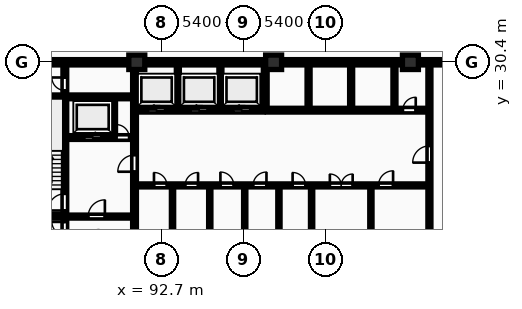
"""IFC4 building model, lengths in metres.
Left out: names, types, materials, properties, quantities, classifications, styles, units other than length and angle.
Written with IfcOpenShell. Run it as: python <this file> out.ifc"""

import sys

from ifc_helpers import new_model, si_unit, direction, frame, frame_2d, origin, origin_2d, place, context, subcontext, project, spatial, rectangle, extrude, element, fill, save


model = new_model("IFC4")
c1 = context("Model", 3, precision=1e-05, world=origin(), true_north=direction((0.0, 1.0)))
c2 = subcontext(c1, "Body", "Model", "MODEL_VIEW")
j1 = project(units=[si_unit("LENGTHUNIT", "METRE"), si_unit("PLANEANGLEUNIT", "RADIAN")], contexts=[c1])
p1 = place(None, origin())
s1 = spatial("IfcSite", under=j1, at=p1, CompositionType="ELEMENT")
p2 = place(p1, origin())
s2 = spatial("IfcBuilding", under=s1, at=p2, CompositionType="ELEMENT")
p3 = place(p2, frame((0.0, 0.0, -10.8)))
s3 = spatial("IfcBuildingStorey", under=s2, at=p3, CompositionType="ELEMENT", Elevation=-10.8)
for number, where, z_axis, x_axis in (
    (1, (91.1, 30.4, -0.45), (0.0, 0.0, 1.0), (1.0, 0.0, 0.0)),
    (2, (100.1, 30.4, -0.45), (0.0, 0.0, 1.0), (1.0, 0.0, 0.0)),
    (3, (109.1, 30.4, -0.45), (0.0, 0.0, 1.0), (1.0, 0.0, 0.0)),
):
    element("IfcColumn", number, at=place(p3, frame(where, z_axis=z_axis, x_axis=x_axis)), inside=s3, PredefinedType="COLUMN", context=c2, shape_type="SweptSolid", body=[
        extrude(rectangle(XDim=1.05, YDim=0.95, at=origin_2d()), origin(), (0.0, 0.0, 1.0), 4.05),
    ])
p4 = place(p3, frame((81.925, 30.4, 0.0), z_axis=(0.0, 0.0, 1.0), x_axis=(1.0, 0.0, 0.0)))
e4 = element("IfcWall", 4, at=p4, inside=s3, PredefinedType="SHEAR", context=c2, shape_type="SweptSolid", body=[
    extrude(rectangle(XDim=36.265, YDim=0.35, at=frame_2d((18.132, 0.0))), origin(), (0.0, 0.0, 1.0), 3.6),
])
p5 = place(p3, frame((86.365, 18.6, 0.0), z_axis=(0.0, 0.0, 1.0), x_axis=(0.0, 1.0, 0.0)))
e5 = element("IfcWall", 5, at=p5, inside=s3, PredefinedType="SHEAR", context=c2, shape_type="SweptSolid", body=[
    extrude(rectangle(XDim=11.6, YDim=0.25, at=frame_2d((5.8, 0.0))), origin(), (0.0, 0.0, 1.0), 3.6),
])
p6 = place(p5, frame((0.45, 0.0, 0.0)))
e6 = element("IfcOpeningElement", 6, at=p6, cuts=e5, PredefinedType="OPENING", context=c2, shape_type="SweptSolid", body=[
    extrude(rectangle(XDim=0.85, YDim=2.05, at=frame_2d((0.425, 1.025))), frame((0.0, 0.135, 0.0), z_axis=(0.0, -1.0, 0.0), x_axis=(1.0, 0.0, 0.0)), (0.0, 0.0, 1.0), 0.27),
])
p7 = place(p5, frame((2.05, 0.0, 0.0)))
e7 = element("IfcOpeningElement", 7, at=p7, cuts=e5, PredefinedType="OPENING", context=c2, shape_type="SweptSolid", body=[
    extrude(rectangle(XDim=1.1, YDim=2.1, at=frame_2d((0.55, 1.05))), frame((0.0, 0.135, 0.0), z_axis=(0.0, -1.0, 0.0), x_axis=(1.0, 0.0, 0.0)), (0.0, 0.0, 1.0), 0.27),
])
p8 = place(p5, frame((9.95, 0.0, 0.0)))
e8 = element("IfcOpeningElement", 8, at=p8, cuts=e5, PredefinedType="OPENING", context=c2, shape_type="SweptSolid", body=[
    extrude(rectangle(XDim=0.85, YDim=2.05, at=frame_2d((0.425, 1.025))), frame((0.0, 0.135, 0.0), z_axis=(0.0, -1.0, 0.0), x_axis=(1.0, 0.0, 0.0)), (0.0, 0.0, 1.0), 0.27),
])
p9 = place(p3, frame((83.0, 20.275, 0.0), z_axis=(0.0, 0.0, 1.0), x_axis=(1.0, 0.0, 0.0)))
e9 = element("IfcWall", 9, at=p9, inside=s3, PredefinedType="SHEAR", context=c2, shape_type="SweptSolid", body=[
    extrude(rectangle(XDim=3.24, YDim=0.25, at=frame_2d((1.62, 0.0))), origin(), (0.0, 0.0, 1.0), 3.6),
])
p10 = place(p3, frame((83.0, 28.125, 0.0), z_axis=(0.0, 0.0, 1.0), x_axis=(1.0, 0.0, 0.0)))
e10 = element("IfcWall", 10, at=p10, inside=s3, PredefinedType="SHEAR", context=c2, shape_type="SweptSolid", body=[
    extrude(rectangle(XDim=7.82, YDim=0.25, at=frame_2d((3.91, 0.0))), origin(), (0.0, 0.0, 1.0), 3.6),
])
p11 = place(p3, frame((86.5, 25.45, 0.0), z_axis=(0.0, 0.0, 1.0), x_axis=(1.0, 0.0, 0.0)))
e11 = element("IfcWall", 11, at=p11, inside=s3, PredefinedType="SHEAR", context=c2, shape_type="SweptSolid", body=[
    extrude(rectangle(XDim=4.32, YDim=0.25, at=frame_2d((2.16, 0.0))), origin(), (0.0, 0.0, 1.0), 3.6),
])
p12 = place(p11, frame((1.14, 0.0, 0.0)))
e12 = element("IfcOpeningElement", 12, at=p12, cuts=e11, PredefinedType="OPENING", context=c2, shape_type="SweptSolid", body=[
    extrude(rectangle(XDim=1.12, YDim=2.12, at=frame_2d((0.56, 1.06))), frame((0.0, 0.135, 0.0), z_axis=(0.0, -1.0, 0.0), x_axis=(1.0, 0.0, 0.0)), (0.0, 0.0, 1.0), 0.27),
])
p13 = place(p11, frame((3.25, 0.0, 0.0)))
e13 = element("IfcOpeningElement", 13, at=p13, cuts=e11, PredefinedType="OPENING", context=c2, shape_type="SweptSolid", body=[
    extrude(rectangle(XDim=0.85, YDim=2.05, at=frame_2d((0.425, 1.025))), frame((0.0, 0.135, 0.0), z_axis=(0.0, -1.0, 0.0), x_axis=(1.0, 0.0, 0.0)), (0.0, 0.0, 1.0), 0.27),
])
p14 = place(p3, frame((89.6, 25.58, 0.0), z_axis=(0.0, 0.0, 1.0), x_axis=(0.0, 1.0, 0.0)))
e14 = element("IfcWall", 14, at=p14, inside=s3, PredefinedType="PARTITIONING", context=c2, shape_type="SweptSolid", body=[
    extrude(rectangle(XDim=2.42, YDim=0.2, at=frame_2d((1.21, 0.0))), origin(), (0.0, 0.0, 1.0), 3.3),
])
p15 = place(p3, frame((86.5, 20.25, 0.0), z_axis=(0.0, 0.0, 1.0), x_axis=(1.0, 0.0, 0.0)))
e15 = element("IfcWall", 15, at=p15, inside=s3, PredefinedType="PARTITIONING", context=c2, shape_type="SweptSolid", body=[
    extrude(rectangle(XDim=4.32, YDim=0.2, at=frame_2d((2.16, 0.0))), origin(), (0.0, 0.0, 1.0), 3.3),
])
p16 = place(p15, frame((1.4, 0.0, 0.0)))
e16 = element("IfcOpeningElement", 16, at=p16, cuts=e15, PredefinedType="OPENING", context=c2, shape_type="SweptSolid", body=[
    extrude(rectangle(XDim=1.1, YDim=2.1, at=frame_2d((0.55, 1.05))), frame((0.0, 0.11, 0.0), z_axis=(0.0, -1.0, 0.0), x_axis=(1.0, 0.0, 0.0)), (0.0, 0.0, 1.0), 0.22),
])
p17 = place(p3, frame((90.95, 18.6, 0.0), z_axis=(0.0, 0.0, 1.0), x_axis=(0.0, 1.0, 0.0)))
e17 = element("IfcWall", 17, at=p17, inside=s3, PredefinedType="SHEAR", context=c2, shape_type="SweptSolid", body=[
    extrude(rectangle(XDim=11.6, YDim=0.25, at=frame_2d((5.8, 0.0))), origin(), (0.0, 0.0, 1.0), 3.6),
])
p18 = place(p17, frame((4.6, 0.0, 0.0)))
e18 = element("IfcOpeningElement", 18, at=p18, cuts=e17, PredefinedType="OPENING", context=c2, shape_type="SweptSolid", body=[
    extrude(rectangle(XDim=1.1, YDim=2.1, at=frame_2d((0.55, 1.05))), frame((0.0, 0.135, 0.0), z_axis=(0.0, -1.0, 0.0), x_axis=(1.0, 0.0, 0.0)), (0.0, 0.0, 1.0), 0.27),
])
for number, where, z_axis, x_axis in (
    (19, (93.8, 27.38, 0.0), (0.0, 0.0, 1.0), (0.0, 1.0, 0.0)),
    (20, (96.6, 27.38, 0.0), (0.0, 0.0, 1.0), (0.0, 1.0, 0.0)),
):
    element("IfcWall", number, at=place(p3, frame(where, z_axis=z_axis, x_axis=x_axis)), inside=s3, PredefinedType="PARTITIONING", context=c2, shape_type="SweptSolid", body=[
        extrude(rectangle(XDim=2.82, YDim=0.2, at=frame_2d((1.41, 0.0))), origin(), (0.0, 0.0, 1.0), 3.3),
    ])
p19 = place(p3, frame((91.08, 27.25, 0.0), z_axis=(0.0, 0.0, 1.0), x_axis=(1.0, 0.0, 0.0)))
e21 = element("IfcWall", 21, at=p19, inside=s3, PredefinedType="SHEAR", context=c2, shape_type="SweptSolid", body=[
    extrude(rectangle(XDim=8.34, YDim=0.25, at=frame_2d((4.17, 0.0))), origin(), (0.0, 0.0, 1.0), 3.6),
])
p20 = place(p19, frame((0.76, 0.0, 0.0)))
e22 = element("IfcOpeningElement", 22, at=p20, cuts=e21, PredefinedType="OPENING", context=c2, shape_type="SweptSolid", body=[
    extrude(rectangle(XDim=1.12, YDim=2.12, at=frame_2d((0.56, 1.06))), frame((0.0, 0.135, 0.0), z_axis=(0.0, -1.0, 0.0), x_axis=(1.0, 0.0, 0.0)), (0.0, 0.0, 1.0), 0.27),
])
p21 = place(p19, frame((3.56, 0.0, 0.0)))
e23 = element("IfcOpeningElement", 23, at=p21, cuts=e21, PredefinedType="OPENING", context=c2, shape_type="SweptSolid", body=[
    extrude(rectangle(XDim=1.12, YDim=2.12, at=frame_2d((0.56, 1.06))), frame((0.0, 0.135, 0.0), z_axis=(0.0, -1.0, 0.0), x_axis=(1.0, 0.0, 0.0)), (0.0, 0.0, 1.0), 0.27),
])
p22 = place(p19, frame((6.36, 0.0, 0.0)))
e24 = element("IfcOpeningElement", 24, at=p22, cuts=e21, PredefinedType="OPENING", context=c2, shape_type="SweptSolid", body=[
    extrude(rectangle(XDim=1.12, YDim=2.12, at=frame_2d((0.56, 1.06))), frame((0.0, 0.135, 0.0), z_axis=(0.0, -1.0, 0.0), x_axis=(1.0, 0.0, 0.0)), (0.0, 0.0, 1.0), 0.27),
])
p23 = place(p3, frame((99.55, 27.25, 0.0), z_axis=(0.0, 0.0, 1.0), x_axis=(0.0, 1.0, 0.0)))
e25 = element("IfcWall", 25, at=p23, inside=s3, PredefinedType="SHEAR", context=c2, shape_type="SweptSolid", body=[
    extrude(rectangle(XDim=2.95, YDim=0.25, at=frame_2d((1.475, 0.0))), origin(), (0.0, 0.0, 1.0), 3.6),
])
for number, where, z_axis, x_axis in (
    (26, (102.4, 27.38, 0.0), (0.0, 0.0, 1.0), (0.0, 1.0, 0.0)),
    (27, (105.2, 27.38, 0.0), (0.0, 0.0, 1.0), (0.0, 1.0, 0.0)),
    (28, (108.05, 27.38, 0.0), (0.0, 0.0, 1.0), (0.0, 1.0, 0.0)),
):
    element("IfcWall", number, at=place(p3, frame(where, z_axis=z_axis, x_axis=x_axis)), inside=s3, PredefinedType="PARTITIONING", context=c2, shape_type="SweptSolid", body=[
        extrude(rectangle(XDim=2.82, YDim=0.2, at=frame_2d((1.41, 0.0))), origin(), (0.0, 0.0, 1.0), 3.3),
    ])
p24 = place(p3, frame((99.68, 27.25, 0.0), z_axis=(0.0, 0.0, 1.0), x_axis=(1.0, 0.0, 0.0)))
e29 = element("IfcWall", 29, at=p24, inside=s3, PredefinedType="SHEAR", context=c2, shape_type="SweptSolid", body=[
    extrude(rectangle(XDim=10.54, YDim=0.25, at=frame_2d((5.27, 0.0))), origin(), (0.0, 0.0, 1.0), 3.6),
])
p25 = place(p24, frame((8.92, 0.0, 0.0)))
e30 = element("IfcOpeningElement", 30, at=p25, cuts=e29, PredefinedType="OPENING", context=c2, shape_type="SweptSolid", body=[
    extrude(rectangle(XDim=0.85, YDim=2.05, at=frame_2d((0.425, 1.025))), frame((0.0, 0.135, 0.0), z_axis=(0.0, -1.0, 0.0), x_axis=(1.0, 0.0, 0.0)), (0.0, 0.0, 1.0), 0.27),
])
for number, where, z_axis, x_axis in (
    (31, (93.45, 18.6, 0.0), (0.0, 0.0, 1.0), (0.0, 1.0, 0.0)),
    (32, (95.9, 18.6, 0.0), (0.0, 0.0, 1.0), (0.0, 1.0, 0.0)),
    (33, (98.2, 18.6, 0.0), (0.0, 0.0, 1.0), (0.0, 1.0, 0.0)),
):
    element("IfcWall", number, at=place(p3, frame(where, z_axis=z_axis, x_axis=x_axis)), inside=s3, PredefinedType="PARTITIONING", context=c2, shape_type="SweptSolid", body=[
        extrude(rectangle(XDim=3.6, YDim=0.15, at=frame_2d((1.8, 0.0))), origin(), (0.0, 0.0, 1.0), 3.3),
    ])
p26 = place(p3, frame((100.45, 18.6, 0.0), z_axis=(0.0, 0.0, 1.0), x_axis=(0.0, 1.0, 0.0)))
e34 = element("IfcWall", 34, at=p26, inside=s3, PredefinedType="PARTITIONING", context=c2, shape_type="SweptSolid", body=[
    extrude(rectangle(XDim=3.6, YDim=0.15, at=frame_2d((1.8, 0.0))), origin(), (0.0, 0.0, 1.0), 2.55),
])
for number, where, z_axis, x_axis in (
    (35, (102.6, 18.6, 0.0), (0.0, 0.0, 1.0), (0.0, 1.0, 0.0)),
    (36, (106.5, 18.6, 0.0), (0.0, 0.0, 1.0), (0.0, 1.0, 0.0)),
):
    element("IfcWall", number, at=place(p3, frame(where, z_axis=z_axis, x_axis=x_axis)), inside=s3, PredefinedType="PARTITIONING", context=c2, shape_type="SweptSolid", body=[
        extrude(rectangle(XDim=3.6, YDim=0.15, at=frame_2d((1.8, 0.0))), origin(), (0.0, 0.0, 1.0), 3.3),
    ])
p27 = place(p3, frame((91.08, 22.3, 0.0), z_axis=(0.0, 0.0, 1.0), x_axis=(1.0, 0.0, 0.0)))
e37 = element("IfcWall", 37, at=p27, inside=s3, PredefinedType="PARTITIONING", context=c2, shape_type="SweptSolid", body=[
    extrude(rectangle(XDim=19.14, YDim=0.2, at=frame_2d((9.57, 0.0))), origin(), (0.0, 0.0, 1.0), 3.3),
])
p28 = place(p27, frame((1.15, 0.0, 0.0)))
e38 = element("IfcOpeningElement", 38, at=p28, cuts=e37, PredefinedType="OPENING", context=c2, shape_type="SweptSolid", body=[
    extrude(rectangle(XDim=0.85, YDim=2.05, at=frame_2d((0.425, 1.025))), frame((0.0, 0.11, 0.0), z_axis=(0.0, -1.0, 0.0), x_axis=(1.0, 0.0, 0.0)), (0.0, 0.0, 1.0), 0.22),
])
p29 = place(p27, frame((3.2, 0.0, 0.0)))
e39 = element("IfcOpeningElement", 39, at=p29, cuts=e37, PredefinedType="OPENING", context=c2, shape_type="SweptSolid", body=[
    extrude(rectangle(XDim=0.85, YDim=2.05, at=frame_2d((0.425, 1.025))), frame((0.0, 0.11, 0.0), z_axis=(0.0, -1.0, 0.0), x_axis=(1.0, 0.0, 0.0)), (0.0, 0.0, 1.0), 0.22),
])
p30 = place(p27, frame((12.72, 0.0, 0.0)))
e40 = element("IfcOpeningElement", 40, at=p30, cuts=e37, PredefinedType="OPENING", context=c2, shape_type="SweptSolid", body=[
    extrude(rectangle(XDim=1.5, YDim=2.2, at=frame_2d((0.75, 1.1))), frame((0.0, 0.11, 0.0), z_axis=(0.0, -1.0, 0.0), x_axis=(1.0, 0.0, 0.0)), (0.0, 0.0, 1.0), 0.22),
])
p31 = place(p27, frame((5.52, 0.0, 0.0)))
e41 = element("IfcOpeningElement", 41, at=p31, cuts=e37, PredefinedType="OPENING", context=c2, shape_type="SweptSolid", body=[
    extrude(rectangle(XDim=0.88, YDim=2.06, at=frame_2d((0.44, 1.03))), frame((0.0, 0.11, 0.0), z_axis=(0.0, -1.0, 0.0), x_axis=(1.0, 0.0, 0.0)), (0.0, 0.0, 1.0), 0.22),
])
p32 = place(p27, frame((7.67, 0.0, 0.0)))
e42 = element("IfcOpeningElement", 42, at=p32, cuts=e37, PredefinedType="OPENING", context=c2, shape_type="SweptSolid", body=[
    extrude(rectangle(XDim=0.88, YDim=2.06, at=frame_2d((0.44, 1.03))), frame((0.0, 0.11, 0.0), z_axis=(0.0, -1.0, 0.0), x_axis=(1.0, 0.0, 0.0)), (0.0, 0.0, 1.0), 0.22),
])
p33 = place(p27, frame((10.27, 0.0, 0.0)))
e43 = element("IfcOpeningElement", 43, at=p33, cuts=e37, PredefinedType="OPENING", context=c2, shape_type="SweptSolid", body=[
    extrude(rectangle(XDim=0.85, YDim=2.05, at=frame_2d((0.425, 1.025))), frame((0.0, 0.11, 0.0), z_axis=(0.0, -1.0, 0.0), x_axis=(1.0, 0.0, 0.0)), (0.0, 0.0, 1.0), 0.22),
])
p34 = place(p27, frame((15.92, 0.0, 0.0)))
e44 = element("IfcOpeningElement", 44, at=p34, cuts=e37, PredefinedType="OPENING", context=c2, shape_type="SweptSolid", body=[
    extrude(rectangle(XDim=0.96, YDim=2.1, at=frame_2d((0.48, 1.05))), frame((0.0, 0.11, 0.0), z_axis=(0.0, -1.0, 0.0), x_axis=(1.0, 0.0, 0.0)), (0.0, 0.0, 1.0), 0.22),
])
p35 = place(p3, frame((110.35, 18.6, 0.0), z_axis=(0.0, 0.0, 1.0), x_axis=(0.0, 1.0, 0.0)))
e45 = element("IfcWall", 45, at=p35, inside=s3, PredefinedType="PARTITIONING", context=c2, shape_type="SweptSolid", body=[
    extrude(rectangle(XDim=11.6, YDim=0.2, at=frame_2d((5.8, 0.0))), origin(), (0.0, 0.0, 1.0), 3.3),
])
p36 = place(p35, frame((5.2, 0.0, 0.0)))
e46 = element("IfcOpeningElement", 46, at=p36, cuts=e45, PredefinedType="OPENING", context=c2, shape_type="SweptSolid", body=[
    extrude(rectangle(XDim=1.1, YDim=2.15, at=frame_2d((0.55, 1.075))), frame((0.0, 0.11, 0.0), z_axis=(0.0, -1.0, 0.0), x_axis=(1.0, 0.0, 0.0)), (0.0, 0.0, 1.0), 0.22),
])
p37 = place(p6, origin())
e47 = element("IfcDoor", 47, at=p37, inside=s3, OperationType="SINGLE_SWING_RIGHT", PredefinedType="DOOR", context=c2, shape_type="SweptSolid", body=[
    extrude(rectangle(XDim=0.85, YDim=2.05, at=frame_2d((0.425, 1.025))), frame((0.0, 0.025, 0.0), z_axis=(0.0, -1.0, 0.0), x_axis=(1.0, 0.0, 0.0)), (0.0, 0.0, 1.0), 0.05),
])
fill(e6, e47)
p38 = place(p7, origin())
e48 = element("IfcDoor", 48, at=p38, inside=s3, OperationType="SINGLE_SWING_LEFT", PredefinedType="DOOR", context=c2, shape_type="SweptSolid", body=[
    extrude(rectangle(XDim=1.1, YDim=2.1, at=frame_2d((0.55, 1.05))), frame((0.0, 0.025, 0.0), z_axis=(0.0, -1.0, 0.0), x_axis=(1.0, 0.0, 0.0)), (0.0, 0.0, 1.0), 0.05),
])
fill(e7, e48)
p39 = place(p8, origin())
e49 = element("IfcDoor", 49, at=p39, inside=s3, OperationType="SINGLE_SWING_RIGHT", PredefinedType="DOOR", context=c2, shape_type="SweptSolid", body=[
    extrude(rectangle(XDim=0.85, YDim=2.05, at=frame_2d((0.425, 1.025))), frame((0.0, 0.025, 0.0), z_axis=(0.0, -1.0, 0.0), x_axis=(1.0, 0.0, 0.0)), (0.0, 0.0, 1.0), 0.05),
])
fill(e8, e49)
p40 = place(p12, origin())
e50 = element("IfcDoor", 50, at=p40, inside=s3, OperationType="SLIDING_TO_RIGHT", PredefinedType="DOOR", context=c2, shape_type="SweptSolid", body=[
    extrude(rectangle(XDim=1.12, YDim=2.12, at=frame_2d((0.56, 1.06))), frame((0.0, 0.025, 0.0), z_axis=(0.0, -1.0, 0.0), x_axis=(1.0, 0.0, 0.0)), (0.0, 0.0, 1.0), 0.05),
])
fill(e12, e50)
p41 = place(p13, origin())
e51 = element("IfcDoor", 51, at=p41, inside=s3, OperationType="SINGLE_SWING_LEFT", PredefinedType="DOOR", context=c2, shape_type="SweptSolid", body=[
    extrude(rectangle(XDim=0.85, YDim=2.05, at=frame_2d((0.425, 1.025))), frame((0.0, 0.025, 0.0), z_axis=(0.0, -1.0, 0.0), x_axis=(1.0, 0.0, 0.0)), (0.0, 0.0, 1.0), 0.05),
])
fill(e13, e51)
p42 = place(p16, origin())
e52 = element("IfcDoor", 52, at=p42, inside=s3, OperationType="SINGLE_SWING_RIGHT", PredefinedType="DOOR", context=c2, shape_type="SweptSolid", body=[
    extrude(rectangle(XDim=1.1, YDim=2.1, at=frame_2d((0.55, 1.05))), frame((0.0, 0.025, 0.0), z_axis=(0.0, -1.0, 0.0), x_axis=(1.0, 0.0, 0.0)), (0.0, 0.0, 1.0), 0.05),
])
fill(e16, e52)
p43 = place(p18, origin())
e53 = element("IfcDoor", 53, at=p43, inside=s3, OperationType="SINGLE_SWING_LEFT", PredefinedType="DOOR", context=c2, shape_type="SweptSolid", body=[
    extrude(rectangle(XDim=1.1, YDim=2.1, at=frame_2d((0.55, 1.05))), frame((0.0, 0.025, 0.0), z_axis=(0.0, -1.0, 0.0), x_axis=(1.0, 0.0, 0.0)), (0.0, 0.0, 1.0), 0.05),
])
fill(e18, e53)
p44 = place(p20, origin())
e54 = element("IfcDoor", 54, at=p44, inside=s3, OperationType="SLIDING_TO_LEFT", PredefinedType="DOOR", context=c2, shape_type="SweptSolid", body=[
    extrude(rectangle(XDim=1.12, YDim=2.12, at=frame_2d((0.56, 1.06))), frame((0.0, 0.025, 0.0), z_axis=(0.0, -1.0, 0.0), x_axis=(1.0, 0.0, 0.0)), (0.0, 0.0, 1.0), 0.05),
])
fill(e22, e54)
p45 = place(p21, origin())
e55 = element("IfcDoor", 55, at=p45, inside=s3, OperationType="SLIDING_TO_LEFT", PredefinedType="DOOR", context=c2, shape_type="SweptSolid", body=[
    extrude(rectangle(XDim=1.12, YDim=2.12, at=frame_2d((0.56, 1.06))), frame((0.0, 0.025, 0.0), z_axis=(0.0, -1.0, 0.0), x_axis=(1.0, 0.0, 0.0)), (0.0, 0.0, 1.0), 0.05),
])
fill(e23, e55)
p46 = place(p22, origin())
e56 = element("IfcDoor", 56, at=p46, inside=s3, OperationType="SLIDING_TO_LEFT", PredefinedType="DOOR", context=c2, shape_type="SweptSolid", body=[
    extrude(rectangle(XDim=1.12, YDim=2.12, at=frame_2d((0.56, 1.06))), frame((0.0, 0.025, 0.0), z_axis=(0.0, -1.0, 0.0), x_axis=(1.0, 0.0, 0.0)), (0.0, 0.0, 1.0), 0.05),
])
fill(e24, e56)
p47 = place(p25, origin())
e57 = element("IfcDoor", 57, at=p47, inside=s3, OperationType="SINGLE_SWING_RIGHT", PredefinedType="DOOR", context=c2, shape_type="SweptSolid", body=[
    extrude(rectangle(XDim=0.85, YDim=2.05, at=frame_2d((0.425, 1.025))), frame((0.0, 0.025, 0.0), z_axis=(0.0, -1.0, 0.0), x_axis=(1.0, 0.0, 0.0)), (0.0, 0.0, 1.0), 0.05),
])
fill(e30, e57)
p48 = place(p28, origin())
e58 = element("IfcDoor", 58, at=p48, inside=s3, OperationType="SINGLE_SWING_LEFT", PredefinedType="DOOR", context=c2, shape_type="SweptSolid", body=[
    extrude(rectangle(XDim=0.85, YDim=2.05, at=frame_2d((0.425, 1.025))), frame((0.0, 0.025, 0.0), z_axis=(0.0, -1.0, 0.0), x_axis=(1.0, 0.0, 0.0)), (0.0, 0.0, 1.0), 0.05),
])
fill(e38, e58)
p49 = place(p29, origin())
e59 = element("IfcDoor", 59, at=p49, inside=s3, OperationType="SINGLE_SWING_RIGHT", PredefinedType="DOOR", context=c2, shape_type="SweptSolid", body=[
    extrude(rectangle(XDim=0.85, YDim=2.05, at=frame_2d((0.425, 1.025))), frame((0.0, 0.025, 0.0), z_axis=(0.0, -1.0, 0.0), x_axis=(1.0, 0.0, 0.0)), (0.0, 0.0, 1.0), 0.05),
])
fill(e39, e59)
p50 = place(p30, origin())
e60 = element("IfcDoor", 60, at=p50, inside=s3, OperationType="DOUBLE_DOOR_SINGLE_SWING", PredefinedType="DOOR", context=c2, shape_type="SweptSolid", body=[
    extrude(rectangle(XDim=1.5, YDim=2.2, at=frame_2d((0.75, 1.1))), frame((0.0, 0.025, 0.0), z_axis=(0.0, -1.0, 0.0), x_axis=(1.0, 0.0, 0.0)), (0.0, 0.0, 1.0), 0.05),
])
fill(e40, e60)
p51 = place(p31, origin())
e61 = element("IfcDoor", 61, at=p51, inside=s3, OperationType="SINGLE_SWING_LEFT", PredefinedType="DOOR", context=c2, shape_type="SweptSolid", body=[
    extrude(rectangle(XDim=0.88, YDim=2.06, at=frame_2d((0.44, 1.03))), frame((0.0, 0.025, 0.0), z_axis=(0.0, -1.0, 0.0), x_axis=(1.0, 0.0, 0.0)), (0.0, 0.0, 1.0), 0.05),
])
fill(e41, e61)
p52 = place(p32, origin())
e62 = element("IfcDoor", 62, at=p52, inside=s3, OperationType="SINGLE_SWING_RIGHT", PredefinedType="DOOR", context=c2, shape_type="SweptSolid", body=[
    extrude(rectangle(XDim=0.88, YDim=2.06, at=frame_2d((0.44, 1.03))), frame((0.0, 0.025, 0.0), z_axis=(0.0, -1.0, 0.0), x_axis=(1.0, 0.0, 0.0)), (0.0, 0.0, 1.0), 0.05),
])
fill(e42, e62)
p53 = place(p33, origin())
e63 = element("IfcDoor", 63, at=p53, inside=s3, OperationType="SINGLE_SWING_LEFT", PredefinedType="DOOR", context=c2, shape_type="SweptSolid", body=[
    extrude(rectangle(XDim=0.85, YDim=2.05, at=frame_2d((0.425, 1.025))), frame((0.0, 0.025, 0.0), z_axis=(0.0, -1.0, 0.0), x_axis=(1.0, 0.0, 0.0)), (0.0, 0.0, 1.0), 0.05),
])
fill(e43, e63)
p54 = place(p34, origin())
e64 = element("IfcDoor", 64, at=p54, inside=s3, OperationType="SINGLE_SWING_RIGHT", PredefinedType="DOOR", context=c2, shape_type="SweptSolid", body=[
    extrude(rectangle(XDim=0.96, YDim=2.1, at=frame_2d((0.48, 1.05))), frame((0.0, 0.025, 0.0), z_axis=(0.0, -1.0, 0.0), x_axis=(1.0, 0.0, 0.0)), (0.0, 0.0, 1.0), 0.05),
])
fill(e44, e64)
p55 = place(p36, origin())
e65 = element("IfcDoor", 65, at=p55, inside=s3, OperationType="SINGLE_SWING_LEFT", PredefinedType="DOOR", context=c2, shape_type="SweptSolid", body=[
    extrude(rectangle(XDim=1.1, YDim=2.15, at=frame_2d((0.55, 1.075))), frame((0.0, 0.025, 0.0), z_axis=(0.0, -1.0, 0.0), x_axis=(1.0, 0.0, 0.0)), (0.0, 0.0, 1.0), 0.05),
])
fill(e46, e65)
save(model, sys.argv[1])
